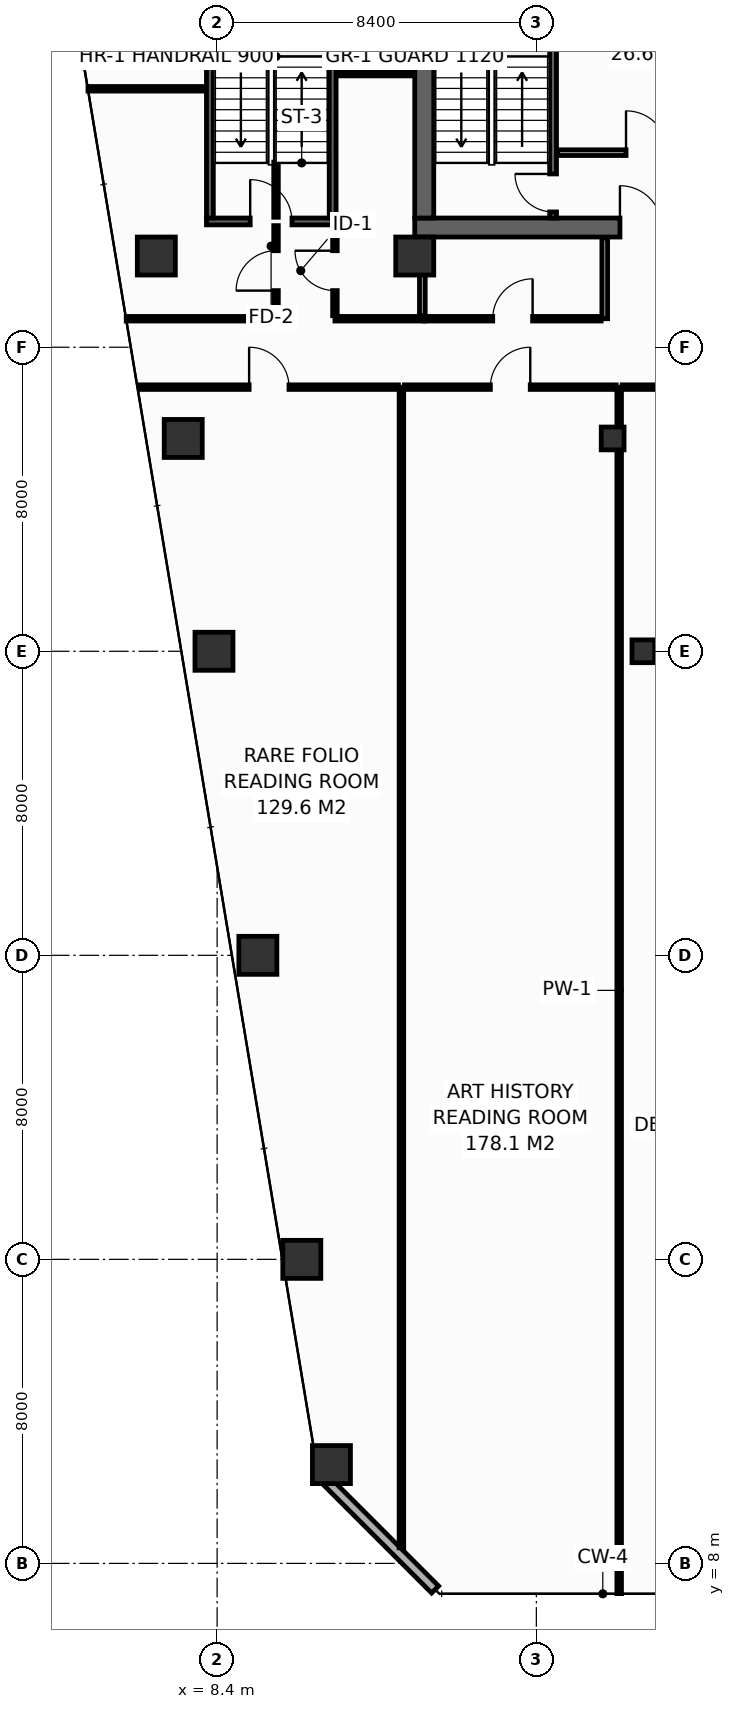
"""IFC4 building model, lengths in metres.
Left out: names, types, materials, properties, quantities, classifications, styles, units other than length and angle.
Written with IfcOpenShell. Run it as: python <this file> out.ifc"""

import sys

from ifc_helpers import new_model, si_unit, direction, frame, frame_2d, origin, origin_2d, place, context, subcontext, project, spatial, rectangle, hollow_rectangle, extrude, element, fill, save


model = new_model("IFC4")
c1 = context("Model", 3, precision=1e-05, world=origin(), true_north=direction((0.0, 1.0)))
c2 = subcontext(c1, "Body", "Model", "MODEL_VIEW")
j1 = project(units=[si_unit("LENGTHUNIT", "METRE"), si_unit("PLANEANGLEUNIT", "RADIAN")], contexts=[c1])
p1 = place(None, origin())
s1 = spatial("IfcSite", under=j1, at=p1, CompositionType="ELEMENT")
p2 = place(p1, origin())
s2 = spatial("IfcBuilding", under=s1, at=p2, CompositionType="ELEMENT")
p3 = place(p2, frame((0.0, 0.0, 129.6)))
s3 = spatial("IfcBuildingStorey", under=s2, at=p3, CompositionType="ELEMENT", Elevation=129.6)
p4 = place(p3, frame((13.6, 43.15, 0.0), z_axis=(0.0, 0.0, 1.0), x_axis=(1.0, 0.0, 0.0)))
e1 = element("IfcWall", 1, at=p4, inside=s3, PredefinedType="SHEAR", context=c2, shape_type="SweptSolid", body=[
    extrude(rectangle(XDim=32.7, YDim=0.5, at=frame_2d((16.35, 0.0))), origin(), (0.0, 0.0, 1.0), 3.55),
])
p5 = place(p4, frame((5.4, 0.0, 0.0)))
e2 = element("IfcOpeningElement", 2, at=p5, cuts=e1, PredefinedType="OPENING", context=c2, shape_type="SweptSolid", body=[
    extrude(rectangle(XDim=1.1, YDim=2.15, at=frame_2d((0.55, 1.075))), frame((0.0, 0.26, 0.0), z_axis=(0.0, -1.0, 0.0), x_axis=(1.0, 0.0, 0.0)), (0.0, 0.0, 1.0), 0.52),
])
p6 = place(p4, frame((25.6, 0.0, 0.0)))
e3 = element("IfcOpeningElement", 3, at=p6, cuts=e1, PredefinedType="OPENING", context=c2, shape_type="SweptSolid", body=[
    extrude(rectangle(XDim=1.1, YDim=2.15, at=frame_2d((0.55, 1.075))), frame((0.0, 0.26, 0.0), z_axis=(0.0, -1.0, 0.0), x_axis=(1.0, 0.0, 0.0)), (0.0, 0.0, 1.0), 0.52),
])
p7 = place(p3, frame((13.85, 43.4, 0.0), z_axis=(0.0, 0.0, 1.0), x_axis=(0.0, 1.0, 0.0)))
e4 = element("IfcWall", 4, at=p7, inside=s3, PredefinedType="SHEAR", context=c2, shape_type="SweptSolid", body=[
    extrude(rectangle(XDim=10.4, YDim=0.5, at=frame_2d((5.2, 0.0))), origin(), (0.0, 0.0, 1.0), 3.55),
])
for number, where, z_axis, x_axis in (
    (5, (6.8, 42.4, 0.0), (0.0, 0.0, 1.0), (1.0, 0.0, 0.0)),
    (6, (13.6, 42.4, 0.0), (0.0, 0.0, 1.0), (1.0, 0.0, 0.0)),
    (7, (11.408, 10.6, 0.0), (0.0, 0.0, 1.0), (1.0, 0.0, 0.0)),
    (8, (10.628, 16.0, 0.0), (0.0, 0.0, 1.0), (1.0, 0.0, 0.0)),
    (9, (9.472, 24.0, 0.0), (0.0, 0.0, 1.0), (1.0, 0.0, 0.0)),
    (10, (8.317, 32.0, 0.0), (0.0, 0.0, 1.0), (1.0, 0.0, 0.0)),
):
    element("IfcColumn", number, at=place(p3, frame(where, z_axis=z_axis, x_axis=x_axis)), inside=s3, PredefinedType="COLUMN", context=c2, shape_type="SweptSolid", body=[
        extrude(hollow_rectangle(XDim=1.0, YDim=1.0, WallThickness=0.045, at=origin_2d()), origin(), (0.0, 0.0, 1.0), 3.8),
    ])
p8 = place(p3, frame((19.617, 32.0, 0.0), z_axis=(0.0, 0.0, 1.0), x_axis=(1.0, 0.0, 0.0)))
e11 = element("IfcColumn", 11, at=p8, inside=s3, PredefinedType="COLUMN", context=c2, shape_type="SweptSolid", body=[
    extrude(hollow_rectangle(XDim=0.6, YDim=0.6, WallThickness=0.028, at=origin_2d()), origin(), (0.0, 0.0, 1.0), 3.8),
])
p9 = place(p3, frame((7.508, 37.6, 0.0), z_axis=(0.0, 0.0, 1.0), x_axis=(1.0, 0.0, 0.0)))
e12 = element("IfcColumn", 12, at=p9, inside=s3, PredefinedType="COLUMN", context=c2, shape_type="SweptSolid", body=[
    extrude(hollow_rectangle(XDim=1.0, YDim=1.0, WallThickness=0.045, at=origin_2d()), origin(), (0.0, 0.0, 1.0), 3.8),
])
p10 = place(p3, frame((18.808, 37.6, 0.0), z_axis=(0.0, 0.0, 1.0), x_axis=(1.0, 0.0, 0.0)))
e13 = element("IfcColumn", 13, at=p10, inside=s3, PredefinedType="COLUMN", context=c2, shape_type="SweptSolid", body=[
    extrude(hollow_rectangle(XDim=0.6, YDim=0.6, WallThickness=0.028, at=origin_2d()), origin(), (0.0, 0.0, 1.0), 3.8),
])
p11 = place(p3, frame((17.24, 43.4, 0.0), z_axis=(0.0, 0.0, 1.0), x_axis=(0.0, 1.0, 0.0)))
e14 = element("IfcWall", 14, at=p11, inside=s3, PredefinedType="SHEAR", context=c2, shape_type="SweptSolid", body=[
    extrude(rectangle(XDim=10.4, YDim=0.18, at=frame_2d((5.2, 0.0))), origin(), (0.0, 0.0, 1.0), 3.55),
])
p12 = place(p11, frame((0.16, 0.0, 0.0)))
e15 = element("IfcOpeningElement", 15, at=p12, cuts=e14, PredefinedType="OPENING", context=c2, shape_type="SweptSolid", body=[
    extrude(rectangle(XDim=1.0, YDim=2.15, at=frame_2d((0.5, 1.075))), frame((0.0, 0.1, 0.0), z_axis=(0.0, -1.0, 0.0), x_axis=(1.0, 0.0, 0.0)), (0.0, 0.0, 1.0), 0.2),
])
p13 = place(p3, frame((8.12, 43.31, 0.0), z_axis=(0.0, 0.0, 1.0), x_axis=(1.0, 0.0, 0.0)))
e16 = element("IfcWall", 16, at=p13, inside=s3, PredefinedType="SHEAR", context=c2, shape_type="SweptSolid", body=[
    extrude(rectangle(XDim=3.41, YDim=0.18, at=frame_2d((1.705, 0.0))), origin(), (0.0, 0.0, 1.0), 3.55),
])
p14 = place(p13, frame((1.15, 0.0, 0.0)))
e17 = element("IfcOpeningElement", 17, at=p14, cuts=e16, PredefinedType="OPENING", context=c2, shape_type="SweptSolid", body=[
    extrude(rectangle(XDim=1.1, YDim=2.15, at=frame_2d((0.55, 1.075))), frame((0.0, 0.1, 0.0), z_axis=(0.0, -1.0, 0.0), x_axis=(1.0, 0.0, 0.0)), (0.0, 0.0, 1.0), 0.2),
])
for number, where, z_axis, x_axis in (
    (18, (11.44, 43.4, 0.0), (0.0, 0.0, 1.0), (0.0, 1.0, 0.0)),
    (19, (8.21, 53.8, 0.0), (0.0, 0.0, 1.0), (0.0, -1.0, 0.0)),
):
    element("IfcWall", number, at=place(p3, frame(where, z_axis=z_axis, x_axis=x_axis)), inside=s3, PredefinedType="SHEAR", context=c2, shape_type="SweptSolid", body=[
        extrude(rectangle(XDim=10.4, YDim=0.18, at=frame_2d((5.2, 0.0))), origin(), (0.0, 0.0, 1.0), 3.55),
    ])
p15 = place(p3, frame((17.36, 45.12, 0.0), z_axis=(0.0, 0.0, 1.0), x_axis=(1.0, 0.0, 0.0)))
e20 = element("IfcWall", 20, at=p15, inside=s3, PredefinedType="PARTITIONING", context=c2, shape_type="SweptSolid", body=[
    extrude(rectangle(XDim=5.14, YDim=0.15, at=frame_2d((2.57, 0.0))), origin(), (0.0, 0.0, 1.0), 3.55),
])
p16 = place(p15, frame((1.8, 0.0, 0.0)))
e21 = element("IfcOpeningElement", 21, at=p16, cuts=e20, PredefinedType="OPENING", context=c2, shape_type="SweptSolid", body=[
    extrude(rectangle(XDim=1.1, YDim=2.15, at=frame_2d((0.55, 1.075))), frame((0.0, 0.085, 0.0), z_axis=(0.0, -1.0, 0.0), x_axis=(1.0, 0.0, 0.0)), (0.0, 0.0, 1.0), 0.17),
])
p17 = place(p3, frame((11.162, 10.287, 0.0), z_axis=(0.0, 0.0, 1.0), x_axis=(0.70707775441, -0.707135806771, 0.0)))
e22 = element("IfcWall", 22, at=p17, inside=s3, PredefinedType="STANDARD", context=c2, shape_type="SweptSolid", body=[
    extrude(rectangle(XDim=4.206, YDim=0.26, at=frame_2d((2.103, 0.0))), origin(), (0.0, 0.0, 1.0), 3.55),
])
p18 = place(p3, frame((6.008, 40.75, 0.0), z_axis=(0.0, 0.0, 1.0), x_axis=(1.0, 0.0, 0.0)))
e23 = element("IfcWall", 23, at=p18, inside=s3, PredefinedType="PARTITIONING", context=c2, shape_type="SweptSolid", body=[
    extrude(rectangle(XDim=3.942, YDim=0.12, at=frame_2d((1.971, 0.0))), origin(), (0.0, 0.0, 1.0), 3.035),
])
p19 = place(p3, frame((11.5, 40.75, 0.0), z_axis=(0.0, 0.0, 1.0), x_axis=(1.0, 0.0, 0.0)))
e24 = element("IfcWall", 24, at=p19, inside=s3, PredefinedType="PARTITIONING", context=c2, shape_type="SweptSolid", body=[
    extrude(rectangle(XDim=2.35, YDim=0.12, at=frame_2d((1.175, 0.0))), origin(), (0.0, 0.0, 1.0), 3.55),
])
p20 = place(p3, frame((5.003, 46.8, 0.0), z_axis=(0.0, 0.0, 1.0), x_axis=(1.0, 0.0, 0.0)))
e25 = element("IfcWall", 25, at=p20, inside=s3, PredefinedType="PARTITIONING", context=c2, shape_type="SweptSolid", body=[
    extrude(rectangle(XDim=3.097, YDim=0.12, at=frame_2d((1.549, 0.0))), origin(), (0.0, 0.0, 1.0), 2.835),
])
p21 = place(p3, frame((9.95, 40.83, 0.0), z_axis=(0.0, 0.0, 1.0), x_axis=(0.0, 1.0, 0.0)))
e26 = element("IfcWall", 26, at=p21, inside=s3, PredefinedType="PARTITIONING", context=c2, shape_type="SweptSolid", body=[
    extrude(rectangle(XDim=2.37, YDim=0.12, at=frame_2d((1.185, 0.0))), origin(), (0.0, 0.0, 1.0), 2.835),
])
p22 = place(p21, frame((0.66, 0.0, 0.0)))
e27 = element("IfcOpeningElement", 27, at=p22, cuts=e26, PredefinedType="OPENING", context=c2, shape_type="SweptSolid", body=[
    extrude(rectangle(XDim=1.05, YDim=2.15, at=frame_2d((0.525, 1.075))), frame((0.0, 0.07, 0.0), z_axis=(0.0, -1.0, 0.0), x_axis=(1.0, 0.0, 0.0)), (0.0, 0.0, 1.0), 0.14),
])
p23 = place(p3, frame((9.95, 43.42, 0.0), z_axis=(0.0, 0.0, 1.0), x_axis=(0.0, 1.0, 0.0)))
e28 = element("IfcWall", 28, at=p23, inside=s3, PredefinedType="PARTITIONING", context=c2, shape_type="SweptSolid", body=[
    extrude(rectangle(XDim=1.45, YDim=0.12, at=frame_2d((0.725, 0.0))), origin(), (0.0, 0.0, 1.0), 3.55),
])
p24 = place(p3, frame((11.55, 47.2, 0.0), z_axis=(0.0, 0.0, 1.0), x_axis=(1.0, 0.0, 0.0)))
e29 = element("IfcWall", 29, at=p24, inside=s3, PredefinedType="PARTITIONING", context=c2, shape_type="SweptSolid", body=[
    extrude(rectangle(XDim=2.03, YDim=0.12, at=frame_2d((1.015, 0.0))), origin(), (0.0, 0.0, 1.0), 3.55),
])
p25 = place(p3, frame((11.5, 40.83, 0.0), z_axis=(0.0, 0.0, 1.0), x_axis=(0.0, 1.0, 0.0)))
e30 = element("IfcWall", 30, at=p25, inside=s3, PredefinedType="PARTITIONING", context=c2, shape_type="SweptSolid", body=[
    extrude(rectangle(XDim=2.37, YDim=0.12, at=frame_2d((1.185, 0.0))), origin(), (0.0, 0.0, 1.0), 2.835),
])
p26 = place(p25, frame((0.66, 0.0, 0.0)))
e31 = element("IfcOpeningElement", 31, at=p26, cuts=e30, PredefinedType="OPENING", context=c2, shape_type="SweptSolid", body=[
    extrude(rectangle(XDim=1.05, YDim=2.15, at=frame_2d((0.525, 1.075))), frame((0.0, 0.07, 0.0), z_axis=(0.0, -1.0, 0.0), x_axis=(1.0, 0.0, 0.0)), (0.0, 0.0, 1.0), 0.14),
])
p27 = place(p3, frame((13.8, 40.83, 0.0), z_axis=(0.0, 0.0, 1.0), x_axis=(0.0, 1.0, 0.0)))
e32 = element("IfcWall", 32, at=p27, inside=s3, PredefinedType="PARTITIONING", context=c2, shape_type="SweptSolid", body=[
    extrude(rectangle(XDim=2.05, YDim=0.15, at=frame_2d((1.025, 0.0))), origin(), (0.0, 0.0, 1.0), 3.55),
])
p28 = place(p3, frame((18.6, 40.75, 0.0), z_axis=(0.0, 0.0, 1.0), x_axis=(0.0, 1.0, 0.0)))
e33 = element("IfcWall", 33, at=p28, inside=s3, PredefinedType="PARTITIONING", context=c2, shape_type="SweptSolid", body=[
    extrude(rectangle(XDim=2.13, YDim=0.15, at=frame_2d((1.065, 0.0))), origin(), (0.0, 0.0, 1.0), 3.55),
])
p29 = place(p3, frame((13.85, 40.75, 0.0), z_axis=(0.0, 0.0, 1.0), x_axis=(1.0, 0.0, 0.0)))
e34 = element("IfcWall", 34, at=p29, inside=s3, PredefinedType="PARTITIONING", context=c2, shape_type="SweptSolid", body=[
    extrude(rectangle(XDim=4.655, YDim=0.12, at=frame_2d((2.327, 0.0))), origin(), (0.0, 0.0, 1.0), 3.55),
])
p30 = place(p29, frame((1.802, 0.0, 0.0)))
e35 = element("IfcOpeningElement", 35, at=p30, cuts=e34, PredefinedType="OPENING", context=c2, shape_type="SweptSolid", body=[
    extrude(rectangle(XDim=1.05, YDim=2.15, at=frame_2d((0.525, 1.075))), frame((0.0, 0.07, 0.0), z_axis=(0.0, -1.0, 0.0), x_axis=(1.0, 0.0, 0.0)), (0.0, 0.0, 1.0), 0.14),
])
p31 = place(p3, frame((13.25, 8.411, 0.0), z_axis=(0.0, 0.0, 1.0), x_axis=(0.0, 1.0, 0.0)))
e36 = element("IfcWall", 36, at=p31, inside=s3, PredefinedType="PARTITIONING", context=c2, shape_type="SweptSolid", body=[
    extrude(rectangle(XDim=30.539, YDim=0.12, at=frame_2d((15.27, 0.0))), origin(), (0.0, 0.0, 1.0), 2.835),
])
p32 = place(p3, frame((18.98, 7.205, 0.0), z_axis=(0.0, 0.0, 1.0), x_axis=(0.0, 1.0, 0.0)))
e37 = element("IfcWall", 37, at=p32, inside=s3, PredefinedType="PARTITIONING", context=c2, shape_type="SweptSolid", body=[
    extrude(rectangle(XDim=31.745, YDim=0.12, at=frame_2d((15.873, 0.0))), origin(), (0.0, 0.0, 1.0), 2.835),
])
p33 = place(p3, frame((6.363, 38.95, 0.0), z_axis=(0.0, 0.0, 1.0), x_axis=(1.0, 0.0, 0.0)))
e38 = element("IfcWall", 38, at=p33, inside=s3, PredefinedType="PARTITIONING", context=c2, shape_type="SweptSolid", body=[
    extrude(rectangle(XDim=6.807, YDim=0.12, at=frame_2d((3.404, 0.0))), origin(), (0.0, 0.0, 1.0), 3.035),
])
p34 = place(p33, frame((2.879, 0.0, 0.0)))
e39 = element("IfcOpeningElement", 39, at=p34, cuts=e38, PredefinedType="OPENING", context=c2, shape_type="SweptSolid", body=[
    extrude(rectangle(XDim=1.05, YDim=2.15, at=frame_2d((0.525, 1.075))), frame((0.0, 0.07, 0.0), z_axis=(0.0, -1.0, 0.0), x_axis=(1.0, 0.0, 0.0)), (0.0, 0.0, 1.0), 0.14),
])
p35 = place(p3, frame((13.33, 38.95, 0.0), z_axis=(0.0, 0.0, 1.0), x_axis=(1.0, 0.0, 0.0)))
e40 = element("IfcWall", 40, at=p35, inside=s3, PredefinedType="PARTITIONING", context=c2, shape_type="SweptSolid", body=[
    extrude(rectangle(XDim=5.57, YDim=0.12, at=frame_2d((2.785, 0.0))), origin(), (0.0, 0.0, 1.0), 3.55),
])
p36 = place(p35, frame((2.26, 0.0, 0.0)))
e41 = element("IfcOpeningElement", 41, at=p36, cuts=e40, PredefinedType="OPENING", context=c2, shape_type="SweptSolid", body=[
    extrude(rectangle(XDim=1.05, YDim=2.15, at=frame_2d((0.525, 1.075))), frame((0.0, 0.07, 0.0), z_axis=(0.0, -1.0, 0.0), x_axis=(1.0, 0.0, 0.0)), (0.0, 0.0, 1.0), 0.14),
])
p37 = place(p3, frame((19.06, 38.95, 0.0), z_axis=(0.0, 0.0, 1.0), x_axis=(1.0, 0.0, 0.0)))
e42 = element("IfcWall", 42, at=p37, inside=s3, PredefinedType="PARTITIONING", context=c2, shape_type="SweptSolid", body=[
    extrude(rectangle(XDim=4.79, YDim=0.12, at=frame_2d((2.395, 0.0))), origin(), (0.0, 0.0, 1.0), 2.835),
])
p38 = place(p37, frame((1.945, 0.0, 0.0)))
e43 = element("IfcOpeningElement", 43, at=p38, cuts=e42, PredefinedType="OPENING", context=c2, shape_type="SweptSolid", body=[
    extrude(rectangle(XDim=0.9, YDim=2.1, at=frame_2d((0.45, 1.05))), frame((0.0, 0.07, 0.0), z_axis=(0.0, -1.0, 0.0), x_axis=(1.0, 0.0, 0.0)), (0.0, 0.0, 1.0), 0.14),
])
p39 = place(p12, origin())
e44 = element("IfcDoor", 44, at=p39, inside=s3, OperationType="SINGLE_SWING_RIGHT", PredefinedType="DOOR", context=c2, shape_type="SweptSolid", body=[
    extrude(rectangle(XDim=1.0, YDim=2.15, at=frame_2d((0.5, 1.075))), frame((0.0, 0.025, 0.0), z_axis=(0.0, -1.0, 0.0), x_axis=(1.0, 0.0, 0.0)), (0.0, 0.0, 1.0), 0.05),
])
fill(e15, e44)
p40 = place(p14, origin())
e45 = element("IfcDoor", 45, at=p40, inside=s3, OperationType="SINGLE_SWING_LEFT", PredefinedType="DOOR", context=c2, shape_type="SweptSolid", body=[
    extrude(rectangle(XDim=1.1, YDim=2.15, at=frame_2d((0.55, 1.075))), frame((0.0, 0.025, 0.0), z_axis=(0.0, -1.0, 0.0), x_axis=(1.0, 0.0, 0.0)), (0.0, 0.0, 1.0), 0.05),
])
fill(e17, e45)
p41 = place(p16, origin())
e46 = element("IfcDoor", 46, at=p41, inside=s3, OperationType="SINGLE_SWING_LEFT", PredefinedType="DOOR", context=c2, shape_type="SweptSolid", body=[
    extrude(rectangle(XDim=1.1, YDim=2.15, at=frame_2d((0.55, 1.075))), frame((0.0, 0.025, 0.0), z_axis=(0.0, -1.0, 0.0), x_axis=(1.0, 0.0, 0.0)), (0.0, 0.0, 1.0), 0.05),
])
fill(e21, e46)
p42 = place(p5, origin())
e47 = element("IfcDoor", 47, at=p42, inside=s3, OperationType="SINGLE_SWING_LEFT", PredefinedType="DOOR", context=c2, shape_type="SweptSolid", body=[
    extrude(rectangle(XDim=1.1, YDim=2.15, at=frame_2d((0.55, 1.075))), frame((0.0, 0.025, 0.0), z_axis=(0.0, -1.0, 0.0), x_axis=(1.0, 0.0, 0.0)), (0.0, 0.0, 1.0), 0.05),
])
fill(e2, e47)
p43 = place(p22, origin())
e48 = element("IfcDoor", 48, at=p43, inside=s3, OperationType="SINGLE_SWING_LEFT", PredefinedType="DOOR", context=c2, shape_type="SweptSolid", body=[
    extrude(rectangle(XDim=1.05, YDim=2.15, at=frame_2d((0.525, 1.075))), frame((0.0, 0.025, 0.0), z_axis=(0.0, -1.0, 0.0), x_axis=(1.0, 0.0, 0.0)), (0.0, 0.0, 1.0), 0.05),
])
fill(e27, e48)
p44 = place(p26, origin())
e49 = element("IfcDoor", 49, at=p44, inside=s3, OperationType="SINGLE_SWING_RIGHT", PredefinedType="DOOR", context=c2, shape_type="SweptSolid", body=[
    extrude(rectangle(XDim=1.05, YDim=2.15, at=frame_2d((0.525, 1.075))), frame((0.0, 0.025, 0.0), z_axis=(0.0, -1.0, 0.0), x_axis=(1.0, 0.0, 0.0)), (0.0, 0.0, 1.0), 0.05),
])
fill(e31, e49)
p45 = place(p30, origin())
e50 = element("IfcDoor", 50, at=p45, inside=s3, OperationType="SINGLE_SWING_RIGHT", PredefinedType="DOOR", context=c2, shape_type="SweptSolid", body=[
    extrude(rectangle(XDim=1.05, YDim=2.15, at=frame_2d((0.525, 1.075))), frame((0.0, 0.025, 0.0), z_axis=(0.0, -1.0, 0.0), x_axis=(1.0, 0.0, 0.0)), (0.0, 0.0, 1.0), 0.05),
])
fill(e35, e50)
p46 = place(p34, origin())
e51 = element("IfcDoor", 51, at=p46, inside=s3, OperationType="SINGLE_SWING_LEFT", PredefinedType="DOOR", context=c2, shape_type="SweptSolid", body=[
    extrude(rectangle(XDim=1.05, YDim=2.15, at=frame_2d((0.525, 1.075))), frame((0.0, 0.025, 0.0), z_axis=(0.0, -1.0, 0.0), x_axis=(1.0, 0.0, 0.0)), (0.0, 0.0, 1.0), 0.05),
])
fill(e39, e51)
p47 = place(p36, origin())
e52 = element("IfcDoor", 52, at=p47, inside=s3, OperationType="SINGLE_SWING_RIGHT", PredefinedType="DOOR", context=c2, shape_type="SweptSolid", body=[
    extrude(rectangle(XDim=1.05, YDim=2.15, at=frame_2d((0.525, 1.075))), frame((0.0, 0.025, 0.0), z_axis=(0.0, -1.0, 0.0), x_axis=(1.0, 0.0, 0.0)), (0.0, 0.0, 1.0), 0.05),
])
fill(e41, e52)
save(model, sys.argv[1])
